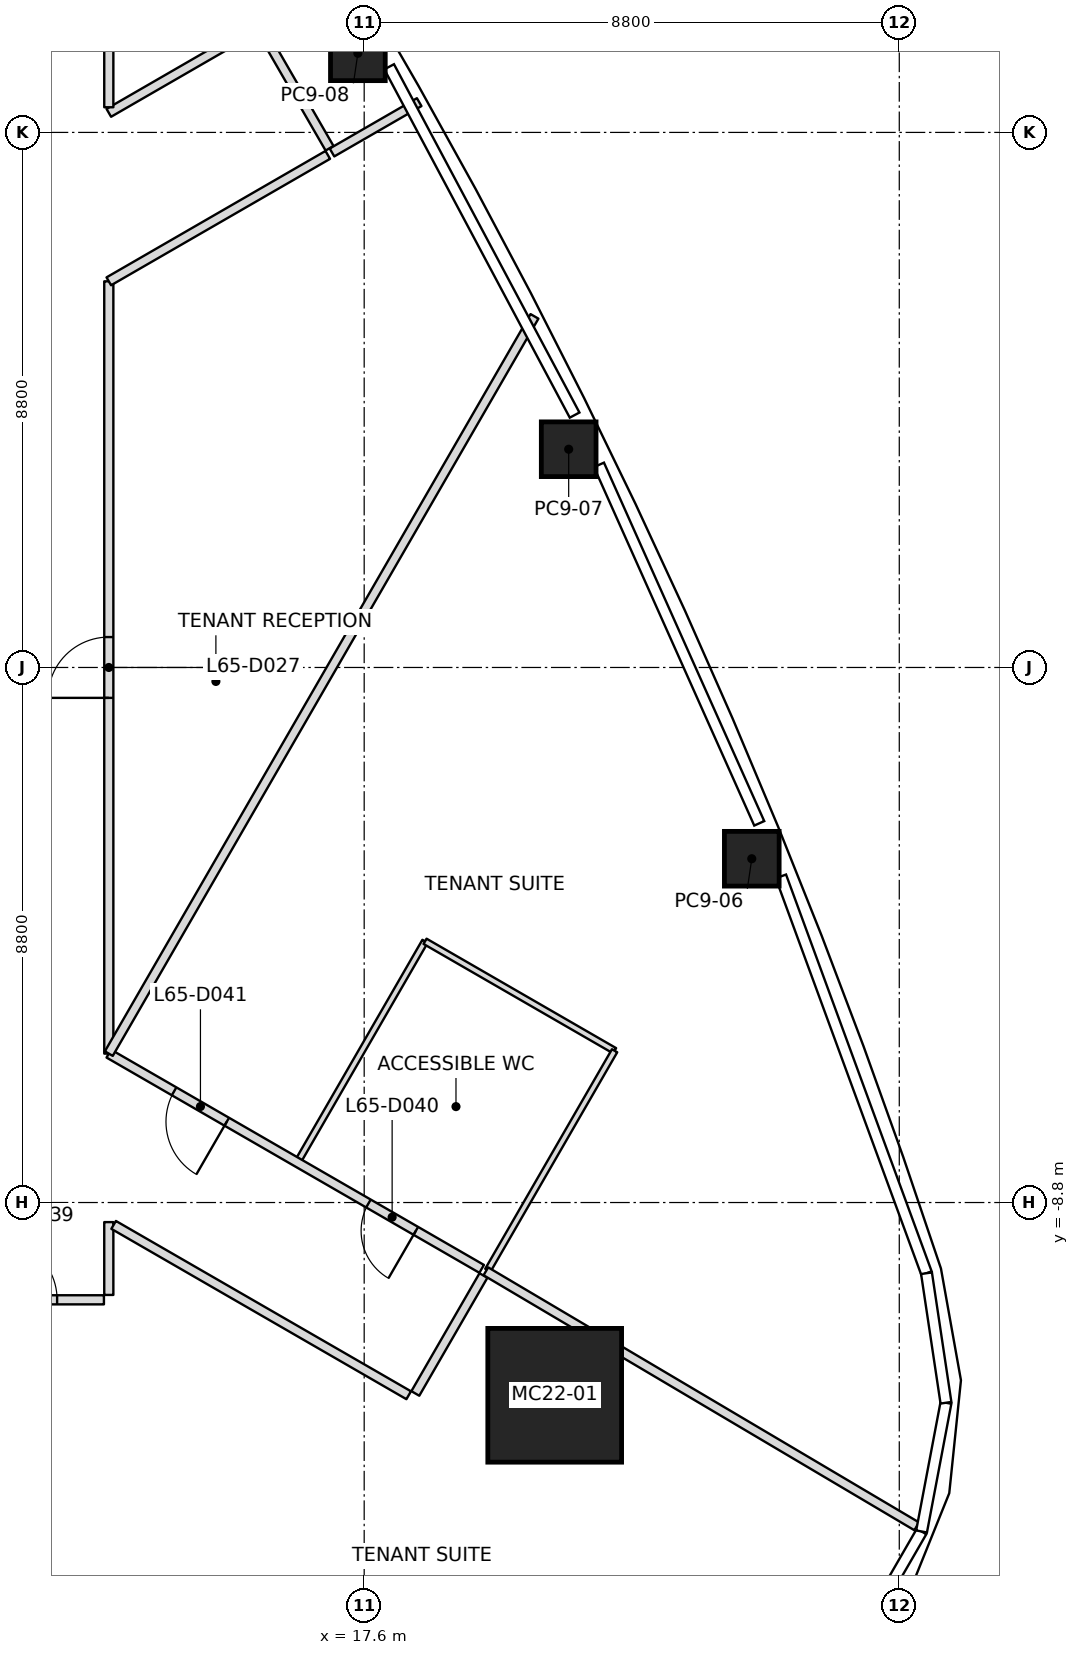
"""IFC4 building model, lengths in metres.
Left out: names, types, materials, properties, quantities, classifications, styles, units other than length and angle.
Written with IfcOpenShell. Run it as: python <this file> out.ifc"""

import sys

from ifc_helpers import new_model, si_unit, direction, frame, frame_2d, origin, origin_2d, place, context, subcontext, project, spatial, rectangle, extrude, element, fill, save


model = new_model("IFC4")
c1 = context("Model", 3, precision=1e-05, world=origin(), true_north=direction((0.0, 1.0)))
c2 = subcontext(c1, "Body", "Model", "MODEL_VIEW")
j1 = project(units=[si_unit("LENGTHUNIT", "METRE"), si_unit("PLANEANGLEUNIT", "RADIAN")], contexts=[c1])
p1 = place(None, origin())
s1 = spatial("IfcSite", under=j1, at=p1, CompositionType="ELEMENT")
p2 = place(p1, origin())
s2 = spatial("IfcBuilding", under=s1, at=p2, CompositionType="ELEMENT")
p3 = place(p2, frame((0.0, 0.0, 287.0)))
s3 = spatial("IfcBuildingStorey", under=s2, at=p3, CompositionType="ELEMENT", Elevation=287.0)
p4 = place(p3, frame((20.733, -11.97, 0.0), z_axis=(-0.027756747396, 0.015983006193, 0.999486921619), x_axis=(0.999614707262, 0.000443807261, 0.027753199115)))
e1 = element("IfcColumn", 1, at=p4, inside=s3, PredefinedType="COLUMN", context=c2, shape_type="SweptSolid", body=[
    extrude(rectangle(XDim=2.2, YDim=2.2, at=origin_2d()), origin(), (0.0, 0.0, 1.0), 4.002),
])
p5 = place(p3, frame((23.974, -3.146, 0.0), z_axis=(-0.017696558482, 0.009885663704, 0.999794531627), x_axis=(-0.376453127918, 0.926300544212, -0.015822271439)))
e2 = element("IfcColumn", 2, at=p5, inside=s3, PredefinedType="COLUMN", context=c2, shape_type="SweptSolid", body=[
    extrude(rectangle(XDim=0.9, YDim=0.9, at=origin_2d()), origin(), (0.0, 0.0, 1.0), 4.001),
])
p6 = place(p3, frame((20.963, 3.589, 0.0), z_axis=(-0.014036676147, 0.001952928855, 0.999899573853), x_axis=(-0.439251595424, 0.898329169532, -0.007920800804)))
e3 = element("IfcColumn", 3, at=p6, inside=s3, PredefinedType="COLUMN", context=c2, shape_type="SweptSolid", body=[
    extrude(rectangle(XDim=0.9, YDim=0.9, at=origin_2d()), origin(), (0.0, 0.0, 1.0), 4.0),
])
p7 = place(p3, frame((17.496, 10.101, 0.0), z_axis=(-0.009887052741, -0.005675900648, 0.999935013058), x_axis=(-0.49997556095, 0.866039512773, -2.7732311e-05)))
e4 = element("IfcColumn", 4, at=p7, inside=s3, PredefinedType="COLUMN", context=c2, shape_type="SweptSolid", body=[
    extrude(rectangle(XDim=0.9, YDim=0.9, at=origin_2d()), origin(), (0.0, 0.0, 1.0), 4.0),
])
p8 = place(p3, frame((20.401, 5.774, 0.0), z_axis=(0.0, 0.0, 1.0), x_axis=(-0.500011755427, -0.866018616679, 0.0)))
e5 = element("IfcWall", 5, at=p8, inside=s3, PredefinedType="PARTITIONING", context=c2, shape_type="SweptSolid", body=[
    extrude(rectangle(XDim=14.001, YDim=0.15, at=frame_2d((7.0, 0.0))), origin(), (0.0, 0.0, 1.0), 3.084),
])
p9 = place(p3, frame((17.071, 8.47, 0.0), z_axis=(0.0, 0.0, 1.0), x_axis=(0.866011236992, 0.500024536802, 0.0)))
e6 = element("IfcWall", 6, at=p9, inside=s3, PredefinedType="PARTITIONING", context=c2, shape_type="SweptSolid", body=[
    extrude(rectangle(XDim=1.656, YDim=0.15, at=frame_2d((0.828, 0.0))), origin(), (0.0, 0.0, 1.0), 3.084),
])
p10 = place(p3, frame((19.601, -9.931, 0.0), z_axis=(0.0, 0.0, 1.0), x_axis=(0.860520712643, -0.509415452369, 0.0)))
e7 = element("IfcWall", 7, at=p10, inside=s3, PredefinedType="PARTITIONING", context=c2, shape_type="SweptSolid", body=[
    extrude(rectangle(XDim=8.234, YDim=0.15, at=frame_2d((4.117, 0.0))), origin(), (0.0, 0.0, 1.0), 3.084),
])
p11 = place(p3, frame((1.2, -10.4, 0.0), z_axis=(0.0, 0.0, 1.0), x_axis=(1.0, 0.0, 0.0)))
e8 = element("IfcWall", 8, at=p11, inside=s3, PredefinedType="PARTITIONING", context=c2, shape_type="SweptSolid", body=[
    extrude(rectangle(XDim=12.12, YDim=0.15, at=frame_2d((6.06, 0.0))), origin(), (0.0, 0.0, 1.0), 3.3),
])
p12 = place(p11, frame((6.85, 0.0, 0.0)))
e9 = element("IfcOpeningElement", 9, at=p12, cuts=e8, PredefinedType="OPENING", context=c2, shape_type="SweptSolid", body=[
    extrude(rectangle(XDim=0.9, YDim=2.1, at=frame_2d((0.45, 1.05))), frame((0.0, 0.075, 0.0), z_axis=(0.0, -1.0, 0.0), x_axis=(1.0, 0.0, 0.0)), (0.0, 0.0, 1.0), 0.15),
])
p13 = place(p11, frame((10.35, 0.0, 0.0)))
e10 = element("IfcOpeningElement", 10, at=p13, cuts=e8, PredefinedType="OPENING", context=c2, shape_type="SweptSolid", body=[
    extrude(rectangle(XDim=1.0, YDim=2.1, at=frame_2d((0.5, 1.05))), frame((0.0, 0.075, 0.0), z_axis=(0.0, -1.0, 0.0), x_axis=(1.0, 0.0, 0.0)), (0.0, 0.0, 1.0), 0.15),
])
p14 = place(p3, frame((13.4, -10.32, 0.0), z_axis=(0.0, 0.0, 1.0), x_axis=(0.0, 1.0, 0.0)))
e11 = element("IfcWall", 11, at=p14, inside=s3, PredefinedType="PARTITIONING", context=c2, shape_type="SweptSolid", body=[
    extrude(rectangle(XDim=1.198, YDim=0.15, at=frame_2d((0.599, 0.0))), origin(), (0.0, 0.0, 1.0), 3.233),
])
p15 = place(p3, frame((13.479, -9.168, 0.0), z_axis=(0.0, 0.0, 1.0), x_axis=(0.866033213741, -0.499986472514, 0.0)))
e12 = element("IfcWall", 12, at=p15, inside=s3, PredefinedType="PARTITIONING", context=c2, shape_type="SweptSolid", body=[
    extrude(rectangle(XDim=5.603, YDim=0.15, at=frame_2d((2.802, 0.0))), origin(), (0.0, 0.0, 1.0), 3.233),
])
p16 = place(p3, frame((13.4, -6.351, 0.0), z_axis=(0.0, 0.0, 1.0), x_axis=(0.0, 1.0, 0.0)))
e13 = element("IfcWall", 13, at=p16, inside=s3, PredefinedType="PARTITIONING", context=c2, shape_type="SweptSolid", body=[
    extrude(rectangle(XDim=12.702, YDim=0.15, at=frame_2d((6.351, 0.0))), origin(), (0.0, 0.0, 1.0), 3.167),
])
p17 = place(p16, frame((5.851, 0.0, 0.0)))
e14 = element("IfcOpeningElement", 14, at=p17, cuts=e13, PredefinedType="OPENING", context=c2, shape_type="SweptSolid", body=[
    extrude(rectangle(XDim=1.0, YDim=2.1, at=frame_2d((0.5, 1.05))), frame((0.0, 0.075, 0.0), z_axis=(0.0, -1.0, 0.0), x_axis=(1.0, 0.0, 0.0)), (0.0, 0.0, 1.0), 0.15),
])
p18 = place(p3, frame((13.4, 6.351, 0.0), z_axis=(0.0, 0.0, 1.0), x_axis=(0.866037957609, 0.499978255508, 0.0)))
e15 = element("IfcWall", 15, at=p18, inside=s3, PredefinedType="PARTITIONING", context=c2, shape_type="SweptSolid", body=[
    extrude(rectangle(XDim=4.158, YDim=0.15, at=frame_2d((2.079, 0.0))), origin(), (0.0, 0.0, 1.0), 3.3),
])
p19 = place(p3, frame((19.532, -9.891, 0.0), z_axis=(0.0, 0.0, 1.0), x_axis=(-0.86602998301, 0.499992068465, 0.0)))
e16 = element("IfcWall", 16, at=p19, inside=s3, PredefinedType="PARTITIONING", context=c2, shape_type="SweptSolid", body=[
    extrude(rectangle(XDim=7.081, YDim=0.15, at=frame_2d((3.54, 0.0))), origin(), (0.0, 0.0, 1.0), 3.167),
])
p20 = place(p19, frame((1.25, 0.0, 0.0)))
e17 = element("IfcOpeningElement", 17, at=p20, cuts=e16, PredefinedType="OPENING", context=c2, shape_type="SweptSolid", body=[
    extrude(rectangle(XDim=0.9, YDim=2.1, at=frame_2d((0.45, 1.05))), frame((0.0, 0.075, 0.0), z_axis=(0.0, -1.0, 0.0), x_axis=(1.0, 0.0, 0.0)), (0.0, 0.0, 1.0), 0.15),
])
p21 = place(p19, frame((4.84, 0.0, 0.0)))
e18 = element("IfcOpeningElement", 18, at=p21, cuts=e16, PredefinedType="OPENING", context=c2, shape_type="SweptSolid", body=[
    extrude(rectangle(XDim=1.0, YDim=2.1, at=frame_2d((0.5, 1.05))), frame((0.0, 0.075, 0.0), z_axis=(0.0, -1.0, 0.0), x_axis=(1.0, 0.0, 0.0)), (0.0, 0.0, 1.0), 0.15),
])
p22 = place(p3, frame((15.801, 10.509, 0.0), z_axis=(0.0, 0.0, 1.0), x_axis=(-0.86601843628, -0.500012067877, 0.0)))
e19 = element("IfcWall", 19, at=p22, inside=s3, PredefinedType="PARTITIONING", context=c2, shape_type="SweptSolid", body=[
    extrude(rectangle(XDim=2.773, YDim=0.15, at=frame_2d((1.386, 0.0))), origin(), (0.0, 0.0, 1.0), 3.3),
])
p23 = place(p3, frame((13.4, 9.214, 0.0), z_axis=(0.0, 0.0, 1.0), x_axis=(0.0, 1.0, 0.0)))
e20 = element("IfcWall", 20, at=p23, inside=s3, PredefinedType="PARTITIONING", context=c2, shape_type="SweptSolid", body=[
    extrude(rectangle(XDim=1.106, YDim=0.15, at=frame_2d((0.553, 0.0))), origin(), (0.0, 0.0, 1.0), 3.3),
])
p24 = place(p3, frame((17.031, 8.539, 0.0), z_axis=(0.0, 0.0, 1.0), x_axis=(-0.500030632641, 0.866007717299, 0.0)))
e21 = element("IfcWall", 21, at=p24, inside=s3, PredefinedType="PARTITIONING", context=c2, shape_type="SweptSolid", body=[
    extrude(rectangle(XDim=2.24, YDim=0.15, at=frame_2d((1.12, 0.0))), origin(), (0.0, 0.0, 1.0), 3.3),
])
p25 = place(p3, frame((18.441, -11.94, 0.0), z_axis=(0.0, 0.0, 1.0), x_axis=(0.500077830873, 0.865980463445, 0.0)))
e22 = element("IfcWall", 22, at=p25, inside=s3, PredefinedType="PARTITIONING", context=c2, shape_type="SweptSolid", body=[
    extrude(rectangle(XDim=2.24, YDim=0.15, at=frame_2d((1.12, 0.0))), origin(), (0.0, 0.0, 1.0), 3.233),
])
p26 = place(p3, frame((16.516, -8.115, 0.0), z_axis=(0.0, 0.0, 1.0), x_axis=(0.500018099276, 0.86601495391, 0.0)))
e23 = element("IfcWall", 23, at=p26, inside=s3, PredefinedType="PARTITIONING", context=c2, shape_type="SweptSolid", body=[
    extrude(rectangle(XDim=4.17, YDim=0.1, at=frame_2d((2.085, 0.0))), origin(), (0.0, 0.0, 1.0), 3.3),
])
p27 = place(p3, frame((18.601, -4.504, 0.0), z_axis=(0.0, 0.0, 1.0), x_axis=(0.866047807691, -0.499961193289, 0.0)))
e24 = element("IfcWall", 24, at=p27, inside=s3, PredefinedType="PARTITIONING", context=c2, shape_type="SweptSolid", body=[
    extrude(rectangle(XDim=3.6, YDim=0.1, at=frame_2d((1.8, 0.0))), origin(), (0.0, 0.0, 1.0), 3.293),
])
p28 = place(p3, frame((21.719, -6.304, 0.0), z_axis=(0.0, 0.0, 1.0), x_axis=(-0.499992746786, -0.866029591389, 0.0)))
e25 = element("IfcWall", 25, at=p28, inside=s3, PredefinedType="PARTITIONING", context=c2, shape_type="SweptSolid", body=[
    extrude(rectangle(XDim=4.17, YDim=0.1, at=frame_2d((2.085, 0.0))), origin(), (0.0, 0.0, 1.0), 3.3),
])
p29 = place(p17, origin())
e26 = element("IfcDoor", 26, at=p29, inside=s3, OperationType="SINGLE_SWING_RIGHT", PredefinedType="DOOR", context=c2, shape_type="SweptSolid", body=[
    extrude(rectangle(XDim=1.0, YDim=2.1, at=frame_2d((0.5, 1.05))), frame((0.0, 0.025, 0.0), z_axis=(0.0, -1.0, 0.0), x_axis=(1.0, 0.0, 0.0)), (0.0, 0.0, 1.0), 0.05),
])
fill(e14, e26)
p30 = place(p13, origin())
e27 = element("IfcDoor", 27, at=p30, inside=s3, OperationType="SINGLE_SWING_LEFT", PredefinedType="DOOR", context=c2, shape_type="SweptSolid", body=[
    extrude(rectangle(XDim=1.0, YDim=2.1, at=frame_2d((0.5, 1.05))), frame((0.0, 0.025, 0.0), z_axis=(0.0, -1.0, 0.0), x_axis=(1.0, 0.0, 0.0)), (0.0, 0.0, 1.0), 0.05),
])
fill(e10, e27)
p31 = place(p20, origin())
e28 = element("IfcDoor", 28, at=p31, inside=s3, OperationType="SINGLE_SWING_RIGHT", PredefinedType="DOOR", context=c2, shape_type="SweptSolid", body=[
    extrude(rectangle(XDim=0.9, YDim=2.1, at=frame_2d((0.45, 1.05))), frame((0.0, 0.025, 0.0), z_axis=(0.0, -1.0, 0.0), x_axis=(1.0, 0.0, 0.0)), (0.0, 0.0, 1.0), 0.05),
])
fill(e17, e28)
p32 = place(p21, origin())
e29 = element("IfcDoor", 29, at=p32, inside=s3, OperationType="SINGLE_SWING_RIGHT", PredefinedType="DOOR", context=c2, shape_type="SweptSolid", body=[
    extrude(rectangle(XDim=1.0, YDim=2.1, at=frame_2d((0.5, 1.05))), frame((0.0, 0.025, 0.0), z_axis=(0.0, -1.0, 0.0), x_axis=(1.0, 0.0, 0.0)), (0.0, 0.0, 1.0), 0.05),
])
fill(e18, e29)
save(model, sys.argv[1])
